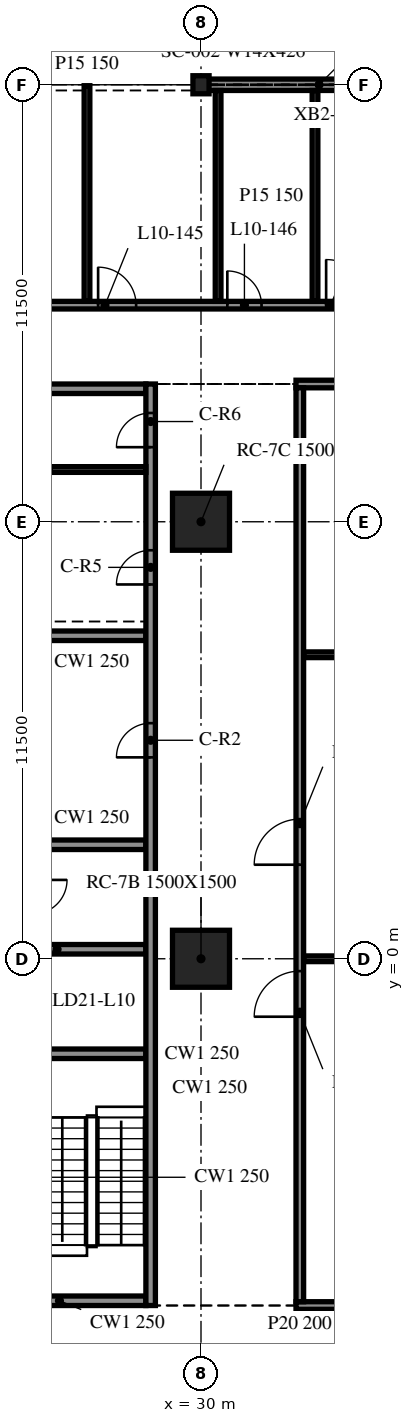
"""IFC4 building model, lengths in metres.
Left out: names, types, materials, properties, quantities, classifications, styles, units other than length and angle.
Written with IfcOpenShell. Run it as: python <this file> out.ifc"""

import sys

from ifc_helpers import new_model, si_unit, direction, frame, frame_2d, origin, origin_2d, place, context, subcontext, project, spatial, rectangle, i_section, extrude, element, fill, save


model = new_model("IFC4")
c1 = context("Model", 3, precision=1e-05, world=origin(), true_north=direction((0.0, 1.0)))
c2 = subcontext(c1, "Body", "Model", "MODEL_VIEW")
j1 = project(units=[si_unit("LENGTHUNIT", "METRE"), si_unit("PLANEANGLEUNIT", "RADIAN")], contexts=[c1])
p1 = place(None, origin())
s1 = spatial("IfcSite", under=j1, at=p1, CompositionType="ELEMENT")
p2 = place(p1, origin())
s2 = spatial("IfcBuilding", under=s1, at=p2, CompositionType="ELEMENT")
p3 = place(p2, frame((0.0, 0.0, 46.0)))
s3 = spatial("IfcBuildingStorey", under=s2, at=p3, CompositionType="ELEMENT", Elevation=46.0)
for number, where, z_axis, x_axis in (
    (1, (30.0, 0.0, -0.34), (0.0, 0.0, 1.0), (1.0, 0.0, 0.0)),
    (2, (30.0, 11.5, -0.34), (0.0, 0.0, 1.0), (1.0, 0.0, 0.0)),
):
    element("IfcColumn", number, at=place(p3, frame(where, z_axis=z_axis, x_axis=x_axis)), inside=s3, PredefinedType="COLUMN", context=c2, shape_type="SweptSolid", body=[
        extrude(rectangle(XDim=1.5, YDim=1.5, at=origin_2d()), origin(), (0.0, 0.0, 1.0), 4.3),
    ])
p4 = place(p3, frame((30.0, 23.0, -0.34), z_axis=(0.0, 0.0, 1.0), x_axis=(1.0, 0.0, 0.0)))
e3 = element("IfcColumn", 3, at=p4, inside=s3, PredefinedType="COLUMN", context=c2, shape_type="SweptSolid", body=[
    extrude(i_section(OverallWidth=0.424, OverallDepth=0.475, WebThickness=0.048, FlangeThickness=0.077, at=origin_2d()), origin(), (0.0, 0.0, 1.0), 4.3),
])
p5 = place(p3, frame((41.976, 23.0, 0.0), z_axis=(0.0, 0.0, 1.0), x_axis=(-1.0, 0.0, 0.0)))
e4 = element("IfcWall", 4, at=p5, inside=s3, PredefinedType="NOTDEFINED", context=c2, shape_type="SweptSolid", body=[
    extrude(rectangle(XDim=11.952, YDim=0.3, at=frame_2d((5.976, 0.0))), origin(), (0.0, 0.0, 1.0), 3.203),
])
p6 = place(p3, frame((28.675, -9.125, 0.0), z_axis=(0.0, 0.0, 1.0), x_axis=(0.0, 1.0, 0.0)))
e5 = element("IfcWall", 5, at=p6, inside=s3, PredefinedType="SOLIDWALL", context=c2, shape_type="SweptSolid", body=[
    extrude(rectangle(XDim=24.25, YDim=0.25, at=frame_2d((12.125, 0.0))), origin(), (0.0, 0.0, 1.0), 3.96),
])
p7 = place(p6, frame((14.425, 0.0, 0.0)))
e6 = element("IfcOpeningElement", 6, at=p7, cuts=e5, PredefinedType="OPENING", context=c2, shape_type="SweptSolid", body=[
    extrude(rectangle(XDim=0.9, YDim=2.1, at=frame_2d((0.45, 1.05))), frame((0.0, 0.135, 0.0), z_axis=(0.0, -1.0, 0.0), x_axis=(1.0, 0.0, 0.0)), (0.0, 0.0, 1.0), 0.27),
])
p8 = place(p6, frame((18.975, 0.0, 0.0)))
e7 = element("IfcOpeningElement", 7, at=p8, cuts=e5, PredefinedType="OPENING", context=c2, shape_type="SweptSolid", body=[
    extrude(rectangle(XDim=0.9, YDim=2.1, at=frame_2d((0.45, 1.05))), frame((0.0, 0.135, 0.0), z_axis=(0.0, -1.0, 0.0), x_axis=(1.0, 0.0, 0.0)), (0.0, 0.0, 1.0), 0.27),
])
p9 = place(p6, frame((22.587, 0.0, 0.0)))
e8 = element("IfcOpeningElement", 8, at=p9, cuts=e5, PredefinedType="OPENING", context=c2, shape_type="SweptSolid", body=[
    extrude(rectangle(XDim=0.9, YDim=2.1, at=frame_2d((0.45, 1.05))), frame((0.0, 0.135, 0.0), z_axis=(0.0, -1.0, 0.0), x_axis=(1.0, 0.0, 0.0)), (0.0, 0.0, 1.0), 0.27),
])
p10 = place(p3, frame((28.55, -9.0, 0.0), z_axis=(0.0, 0.0, 1.0), x_axis=(-1.0, 0.0, 0.0)))
e9 = element("IfcWall", 9, at=p10, inside=s3, PredefinedType="SOLIDWALL", context=c2, shape_type="SweptSolid", body=[
    extrude(rectangle(XDim=9.1, YDim=0.25, at=frame_2d((4.55, 0.0))), origin(), (0.0, 0.0, 1.0), 3.96),
])
p11 = place(p10, frame((3.65, 0.0, 0.0)))
e10 = element("IfcOpeningElement", 10, at=p11, cuts=e9, PredefinedType="OPENING", context=c2, shape_type="SweptSolid", body=[
    extrude(rectangle(XDim=1.8, YDim=2.1, at=frame_2d((0.9, 1.05))), frame((0.0, 0.135, 0.0), z_axis=(0.0, -1.0, 0.0), x_axis=(1.0, 0.0, 0.0)), (0.0, 0.0, 1.0), 0.27),
])
p12 = place(p3, frame((19.45, 15.0, 0.0), z_axis=(0.0, 0.0, 1.0), x_axis=(1.0, 0.0, 0.0)))
e11 = element("IfcWall", 11, at=p12, inside=s3, PredefinedType="SOLIDWALL", context=c2, shape_type="SweptSolid", body=[
    extrude(rectangle(XDim=9.1, YDim=0.25, at=frame_2d((4.55, 0.0))), origin(), (0.0, 0.0, 1.0), 3.96),
])
p13 = place(p12, frame((3.65, 0.0, 0.0)))
e12 = element("IfcOpeningElement", 12, at=p13, cuts=e11, PredefinedType="OPENING", context=c2, shape_type="SweptSolid", body=[
    extrude(rectangle(XDim=1.8, YDim=2.1, at=frame_2d((0.9, 1.05))), frame((0.0, 0.135, 0.0), z_axis=(0.0, -1.0, 0.0), x_axis=(1.0, 0.0, 0.0)), (0.0, 0.0, 1.0), 0.27),
])
for number, where, z_axis, x_axis in (
    (13, (25.7, -2.5, 0.0), (0.0, 0.0, 1.0), (1.0, 0.0, 0.0)),
    (14, (25.7, 0.25, 0.0), (0.0, 0.0, 1.0), (1.0, 0.0, 0.0)),
    (15, (25.7, 3.0, 0.0), (0.0, 0.0, 1.0), (1.0, 0.0, 0.0)),
    (16, (25.7, 8.5, 0.0), (0.0, 0.0, 1.0), (1.0, 0.0, 0.0)),
):
    element("IfcWall", number, at=place(p3, frame(where, z_axis=z_axis, x_axis=x_axis)), inside=s3, PredefinedType="SOLIDWALL", context=c2, shape_type="SweptSolid", body=[
        extrude(rectangle(XDim=2.85, YDim=0.25, at=frame_2d((1.425, 0.0))), origin(), (0.0, 0.0, 1.0), 3.96),
    ])
p14 = place(p3, frame((25.7, 12.875, 0.0), z_axis=(0.0, 0.0, 1.0), x_axis=(1.0, 0.0, 0.0)))
e17 = element("IfcWall", 17, at=p14, inside=s3, PredefinedType="PARTITIONING", context=c2, shape_type="SweptSolid", body=[
    extrude(rectangle(XDim=2.85, YDim=0.15, at=frame_2d((1.425, 0.0))), origin(), (0.0, 0.0, 1.0), 3.96),
])
p15 = place(p3, frame((32.5, -9.125, 0.0), z_axis=(0.0, 0.0, 1.0), x_axis=(1.0, 0.0, 0.0)))
e18 = element("IfcWall", 18, at=p15, inside=s3, PredefinedType="PARTITIONING", context=c2, shape_type="SweptSolid", body=[
    extrude(rectangle(XDim=19.45, YDim=0.2, at=frame_2d((9.725, 0.0))), origin(), (0.0, 0.0, 1.0), 3.96),
])
p16 = place(p15, frame((9.1, 0.0, 0.0)))
e19 = element("IfcOpeningElement", 19, at=p16, cuts=e18, PredefinedType="OPENING", context=c2, shape_type="SweptSolid", body=[
    extrude(rectangle(XDim=1.2, YDim=2.1, at=frame_2d((0.6, 1.05))), frame((0.0, 0.11, 0.0), z_axis=(0.0, -1.0, 0.0), x_axis=(1.0, 0.0, 0.0)), (0.0, 0.0, 1.0), 0.22),
])
p17 = place(p3, frame((32.7, 0.0, 0.0), z_axis=(0.0, 0.0, 1.0), x_axis=(1.0, 0.0, 0.0)))
e20 = element("IfcWall", 20, at=p17, inside=s3, PredefinedType="PARTITIONING", context=c2, shape_type="SweptSolid", body=[
    extrude(rectangle(XDim=8.55, YDim=0.15, at=frame_2d((4.275, 0.0))), origin(), (0.0, 0.0, 1.0), 3.96),
])
p18 = place(p3, frame((32.7, 8.0, 0.0), z_axis=(0.0, 0.0, 1.0), x_axis=(1.0, 0.0, 0.0)))
e21 = element("IfcWall", 21, at=p18, inside=s3, PredefinedType="PARTITIONING", context=c2, shape_type="SweptSolid", body=[
    extrude(rectangle(XDim=19.05, YDim=0.15, at=frame_2d((9.525, 0.0))), origin(), (0.0, 0.0, 1.0), 3.96),
])
p19 = place(p3, frame((32.5, 15.125, 0.0), z_axis=(0.0, 0.0, 1.0), x_axis=(1.0, 0.0, 0.0)))
e22 = element("IfcWall", 22, at=p19, inside=s3, PredefinedType="PARTITIONING", context=c2, shape_type="SweptSolid", body=[
    extrude(rectangle(XDim=19.45, YDim=0.2, at=frame_2d((9.725, 0.0))), origin(), (0.0, 0.0, 1.0), 3.96),
])
p20 = place(p19, frame((5.3, 0.0, 0.0)))
e23 = element("IfcOpeningElement", 23, at=p20, cuts=e22, PredefinedType="OPENING", context=c2, shape_type="SweptSolid", body=[
    extrude(rectangle(XDim=1.0, YDim=2.1, at=frame_2d((0.5, 1.05))), frame((0.0, 0.11, 0.0), z_axis=(0.0, -1.0, 0.0), x_axis=(1.0, 0.0, 0.0)), (0.0, 0.0, 1.0), 0.22),
])
p21 = place(p19, frame((9.3, 0.0, 0.0)))
e24 = element("IfcOpeningElement", 24, at=p21, cuts=e22, PredefinedType="OPENING", context=c2, shape_type="SweptSolid", body=[
    extrude(rectangle(XDim=1.0, YDim=2.1, at=frame_2d((0.5, 1.05))), frame((0.0, 0.11, 0.0), z_axis=(0.0, -1.0, 0.0), x_axis=(1.0, 0.0, 0.0)), (0.0, 0.0, 1.0), 0.22),
])
p22 = place(p3, frame((-41.807, 17.2, 0.0), z_axis=(0.0, 0.0, 1.0), x_axis=(1.0, 0.0, 0.0)))
e25 = element("IfcWall", 25, at=p22, inside=s3, PredefinedType="PARTITIONING", context=c2, shape_type="SweptSolid", body=[
    extrude(rectangle(XDim=95.615, YDim=0.2, at=frame_2d((47.807, 0.0))), origin(), (0.0, 0.0, 1.0), 3.96),
])
p23 = place(p22, frame((7.5, 0.0, 0.0)))
e26 = element("IfcOpeningElement", 26, at=p23, cuts=e25, PredefinedType="OPENING", context=c2, shape_type="SweptSolid", body=[
    extrude(rectangle(XDim=1.0, YDim=2.1, at=frame_2d((0.5, 1.05))), frame((0.0, 0.11, 0.0), z_axis=(0.0, -1.0, 0.0), x_axis=(1.0, 0.0, 0.0)), (0.0, 0.0, 1.0), 0.22),
])
p24 = place(p22, frame((10.9, 0.0, 0.0)))
e27 = element("IfcOpeningElement", 27, at=p24, cuts=e25, PredefinedType="OPENING", context=c2, shape_type="SweptSolid", body=[
    extrude(rectangle(XDim=1.0, YDim=2.1, at=frame_2d((0.5, 1.05))), frame((0.0, 0.11, 0.0), z_axis=(0.0, -1.0, 0.0), x_axis=(1.0, 0.0, 0.0)), (0.0, 0.0, 1.0), 0.22),
])
p25 = place(p22, frame((13.7, 0.0, 0.0)))
e28 = element("IfcOpeningElement", 28, at=p25, cuts=e25, PredefinedType="OPENING", context=c2, shape_type="SweptSolid", body=[
    extrude(rectangle(XDim=0.9, YDim=2.1, at=frame_2d((0.45, 1.05))), frame((0.0, 0.11, 0.0), z_axis=(0.0, -1.0, 0.0), x_axis=(1.0, 0.0, 0.0)), (0.0, 0.0, 1.0), 0.22),
])
p26 = place(p22, frame((22.3, 0.0, 0.0)))
e29 = element("IfcOpeningElement", 29, at=p26, cuts=e25, PredefinedType="OPENING", context=c2, shape_type="SweptSolid", body=[
    extrude(rectangle(XDim=1.2, YDim=2.1, at=frame_2d((0.6, 1.05))), frame((0.0, 0.11, 0.0), z_axis=(0.0, -1.0, 0.0), x_axis=(1.0, 0.0, 0.0)), (0.0, 0.0, 1.0), 0.22),
])
p27 = place(p22, frame((28.7, 0.0, 0.0)))
e30 = element("IfcOpeningElement", 30, at=p27, cuts=e25, PredefinedType="OPENING", context=c2, shape_type="SweptSolid", body=[
    extrude(rectangle(XDim=0.9, YDim=2.1, at=frame_2d((0.45, 1.05))), frame((0.0, 0.11, 0.0), z_axis=(0.0, -1.0, 0.0), x_axis=(1.0, 0.0, 0.0)), (0.0, 0.0, 1.0), 0.22),
])
p28 = place(p22, frame((37.5, 0.0, 0.0)))
e31 = element("IfcOpeningElement", 31, at=p28, cuts=e25, PredefinedType="OPENING", context=c2, shape_type="SweptSolid", body=[
    extrude(rectangle(XDim=1.0, YDim=2.1, at=frame_2d((0.5, 1.05))), frame((0.0, 0.11, 0.0), z_axis=(0.0, -1.0, 0.0), x_axis=(1.0, 0.0, 0.0)), (0.0, 0.0, 1.0), 0.22),
])
p29 = place(p22, frame((40.9, 0.0, 0.0)))
e32 = element("IfcOpeningElement", 32, at=p29, cuts=e25, PredefinedType="OPENING", context=c2, shape_type="SweptSolid", body=[
    extrude(rectangle(XDim=1.0, YDim=2.1, at=frame_2d((0.5, 1.05))), frame((0.0, 0.11, 0.0), z_axis=(0.0, -1.0, 0.0), x_axis=(1.0, 0.0, 0.0)), (0.0, 0.0, 1.0), 0.22),
])
p30 = place(p22, frame((43.7, 0.0, 0.0)))
e33 = element("IfcOpeningElement", 33, at=p30, cuts=e25, PredefinedType="OPENING", context=c2, shape_type="SweptSolid", body=[
    extrude(rectangle(XDim=0.9, YDim=2.1, at=frame_2d((0.45, 1.05))), frame((0.0, 0.11, 0.0), z_axis=(0.0, -1.0, 0.0), x_axis=(1.0, 0.0, 0.0)), (0.0, 0.0, 1.0), 0.22),
])
p31 = place(p22, frame((47.3, 0.0, 0.0)))
e34 = element("IfcOpeningElement", 34, at=p31, cuts=e25, PredefinedType="OPENING", context=c2, shape_type="SweptSolid", body=[
    extrude(rectangle(XDim=1.2, YDim=2.1, at=frame_2d((0.6, 1.05))), frame((0.0, 0.11, 0.0), z_axis=(0.0, -1.0, 0.0), x_axis=(1.0, 0.0, 0.0)), (0.0, 0.0, 1.0), 0.22),
])
p32 = place(p22, frame((54.1, 0.0, 0.0)))
e35 = element("IfcOpeningElement", 35, at=p32, cuts=e25, PredefinedType="OPENING", context=c2, shape_type="SweptSolid", body=[
    extrude(rectangle(XDim=0.9, YDim=2.1, at=frame_2d((0.45, 1.05))), frame((0.0, 0.11, 0.0), z_axis=(0.0, -1.0, 0.0), x_axis=(1.0, 0.0, 0.0)), (0.0, 0.0, 1.0), 0.22),
])
p33 = place(p22, frame((60.1, 0.0, 0.0)))
e36 = element("IfcOpeningElement", 36, at=p33, cuts=e25, PredefinedType="OPENING", context=c2, shape_type="SweptSolid", body=[
    extrude(rectangle(XDim=1.0, YDim=2.1, at=frame_2d((0.5, 1.05))), frame((0.0, 0.11, 0.0), z_axis=(0.0, -1.0, 0.0), x_axis=(1.0, 0.0, 0.0)), (0.0, 0.0, 1.0), 0.22),
])
p34 = place(p22, frame((69.1, 0.0, 0.0)))
e37 = element("IfcOpeningElement", 37, at=p34, cuts=e25, PredefinedType="OPENING", context=c2, shape_type="SweptSolid", body=[
    extrude(rectangle(XDim=1.0, YDim=2.1, at=frame_2d((0.5, 1.05))), frame((0.0, 0.11, 0.0), z_axis=(0.0, -1.0, 0.0), x_axis=(1.0, 0.0, 0.0)), (0.0, 0.0, 1.0), 0.22),
])
p35 = place(p22, frame((72.5, 0.0, 0.0)))
e38 = element("IfcOpeningElement", 38, at=p35, cuts=e25, PredefinedType="OPENING", context=c2, shape_type="SweptSolid", body=[
    extrude(rectangle(XDim=0.9, YDim=2.1, at=frame_2d((0.45, 1.05))), frame((0.0, 0.11, 0.0), z_axis=(0.0, -1.0, 0.0), x_axis=(1.0, 0.0, 0.0)), (0.0, 0.0, 1.0), 0.22),
])
p36 = place(p22, frame((75.1, 0.0, 0.0)))
e39 = element("IfcOpeningElement", 39, at=p36, cuts=e25, PredefinedType="OPENING", context=c2, shape_type="SweptSolid", body=[
    extrude(rectangle(XDim=1.2, YDim=2.1, at=frame_2d((0.6, 1.05))), frame((0.0, 0.11, 0.0), z_axis=(0.0, -1.0, 0.0), x_axis=(1.0, 0.0, 0.0)), (0.0, 0.0, 1.0), 0.22),
])
p37 = place(p22, frame((84.1, 0.0, 0.0)))
e40 = element("IfcOpeningElement", 40, at=p37, cuts=e25, PredefinedType="OPENING", context=c2, shape_type="SweptSolid", body=[
    extrude(rectangle(XDim=0.9, YDim=2.1, at=frame_2d((0.45, 1.05))), frame((0.0, 0.11, 0.0), z_axis=(0.0, -1.0, 0.0), x_axis=(1.0, 0.0, 0.0)), (0.0, 0.0, 1.0), 0.22),
])
p38 = place(p22, frame((90.1, 0.0, 0.0)))
e41 = element("IfcOpeningElement", 41, at=p38, cuts=e25, PredefinedType="OPENING", context=c2, shape_type="SweptSolid", body=[
    extrude(rectangle(XDim=1.0, YDim=2.1, at=frame_2d((0.5, 1.05))), frame((0.0, 0.11, 0.0), z_axis=(0.0, -1.0, 0.0), x_axis=(1.0, 0.0, 0.0)), (0.0, 0.0, 1.0), 0.22),
])
p39 = place(p3, frame((27.0, 17.3, 0.0), z_axis=(0.0, 0.0, 1.0), x_axis=(0.0, 1.0, 0.0)))
e42 = element("IfcWall", 42, at=p39, inside=s3, PredefinedType="PARTITIONING", context=c2, shape_type="SweptSolid", body=[
    extrude(rectangle(XDim=5.675, YDim=0.15, at=frame_2d((2.837, 0.0))), origin(), (0.0, 0.0, 1.0), 3.96),
])
p40 = place(p3, frame((30.45, 17.3, 0.0), z_axis=(0.0, 0.0, 1.0), x_axis=(0.0, 1.0, 0.0)))
e43 = element("IfcWall", 43, at=p40, inside=s3, PredefinedType="PARTITIONING", context=c2, shape_type="SweptSolid", body=[
    extrude(rectangle(XDim=5.55, YDim=0.15, at=frame_2d((2.775, 0.0))), origin(), (0.0, 0.0, 1.0), 3.96),
])
p41 = place(p3, frame((32.6, -9.025, 0.0), z_axis=(0.0, 0.0, 1.0), x_axis=(0.0, 1.0, 0.0)))
e44 = element("IfcWall", 44, at=p41, inside=s3, PredefinedType="PARTITIONING", context=c2, shape_type="SweptSolid", body=[
    extrude(rectangle(XDim=24.05, YDim=0.2, at=frame_2d((12.025, 0.0))), origin(), (0.0, 0.0, 1.0), 3.96),
])
p42 = place(p41, frame((7.5, 0.0, 0.0)))
e45 = element("IfcOpeningElement", 45, at=p42, cuts=e44, PredefinedType="OPENING", context=c2, shape_type="SweptSolid", body=[
    extrude(rectangle(XDim=1.2, YDim=2.1, at=frame_2d((0.6, 1.05))), frame((0.0, 0.11, 0.0), z_axis=(0.0, -1.0, 0.0), x_axis=(1.0, 0.0, 0.0)), (0.0, 0.0, 1.0), 0.22),
])
p43 = place(p41, frame((11.5, 0.0, 0.0)))
e46 = element("IfcOpeningElement", 46, at=p43, cuts=e44, PredefinedType="OPENING", context=c2, shape_type="SweptSolid", body=[
    extrude(rectangle(XDim=1.2, YDim=2.1, at=frame_2d((0.6, 1.05))), frame((0.0, 0.11, 0.0), z_axis=(0.0, -1.0, 0.0), x_axis=(1.0, 0.0, 0.0)), (0.0, 0.0, 1.0), 0.22),
])
p44 = place(p3, frame((33.0, 17.3, 0.0), z_axis=(0.0, 0.0, 1.0), x_axis=(0.0, 1.0, 0.0)))
e47 = element("IfcWall", 47, at=p44, inside=s3, PredefinedType="PARTITIONING", context=c2, shape_type="SweptSolid", body=[
    extrude(rectangle(XDim=5.55, YDim=0.15, at=frame_2d((2.775, 0.0))), origin(), (0.0, 0.0, 1.0), 3.96),
])
p45 = place(p7, origin())
e48 = element("IfcDoor", 48, at=p45, inside=s3, OperationType="SINGLE_SWING_RIGHT", PredefinedType="DOOR", context=c2, shape_type="SweptSolid", body=[
    extrude(rectangle(XDim=0.9, YDim=2.1, at=frame_2d((0.45, 1.05))), frame((0.0, 0.025, 0.0), z_axis=(0.0, -1.0, 0.0), x_axis=(1.0, 0.0, 0.0)), (0.0, 0.0, 1.0), 0.05),
])
fill(e6, e48)
p46 = place(p8, origin())
e49 = element("IfcDoor", 49, at=p46, inside=s3, OperationType="SINGLE_SWING_LEFT", PredefinedType="DOOR", context=c2, shape_type="SweptSolid", body=[
    extrude(rectangle(XDim=0.9, YDim=2.1, at=frame_2d((0.45, 1.05))), frame((0.0, 0.025, 0.0), z_axis=(0.0, -1.0, 0.0), x_axis=(1.0, 0.0, 0.0)), (0.0, 0.0, 1.0), 0.05),
])
fill(e7, e49)
p47 = place(p9, origin())
e50 = element("IfcDoor", 50, at=p47, inside=s3, OperationType="SINGLE_SWING_RIGHT", PredefinedType="DOOR", context=c2, shape_type="SweptSolid", body=[
    extrude(rectangle(XDim=0.9, YDim=2.1, at=frame_2d((0.45, 1.05))), frame((0.0, 0.025, 0.0), z_axis=(0.0, -1.0, 0.0), x_axis=(1.0, 0.0, 0.0)), (0.0, 0.0, 1.0), 0.05),
])
fill(e8, e50)
p48 = place(p42, origin())
e51 = element("IfcDoor", 51, at=p48, inside=s3, OperationType="SINGLE_SWING_RIGHT", PredefinedType="DOOR", context=c2, shape_type="SweptSolid", body=[
    extrude(rectangle(XDim=1.2, YDim=2.1, at=frame_2d((0.6, 1.05))), frame((0.0, 0.025, 0.0), z_axis=(0.0, -1.0, 0.0), x_axis=(1.0, 0.0, 0.0)), (0.0, 0.0, 1.0), 0.05),
])
fill(e45, e51)
p49 = place(p43, origin())
e52 = element("IfcDoor", 52, at=p49, inside=s3, OperationType="SINGLE_SWING_LEFT", PredefinedType="DOOR", context=c2, shape_type="SweptSolid", body=[
    extrude(rectangle(XDim=1.2, YDim=2.1, at=frame_2d((0.6, 1.05))), frame((0.0, 0.025, 0.0), z_axis=(0.0, -1.0, 0.0), x_axis=(1.0, 0.0, 0.0)), (0.0, 0.0, 1.0), 0.05),
])
fill(e46, e52)
p50 = place(p34, origin())
e53 = element("IfcDoor", 53, at=p50, inside=s3, OperationType="SINGLE_SWING_RIGHT", PredefinedType="DOOR", context=c2, shape_type="SweptSolid", body=[
    extrude(rectangle(XDim=1.0, YDim=2.1, at=frame_2d((0.5, 1.05))), frame((0.0, 0.025, 0.0), z_axis=(0.0, -1.0, 0.0), x_axis=(1.0, 0.0, 0.0)), (0.0, 0.0, 1.0), 0.05),
])
fill(e37, e53)
p51 = place(p35, origin())
e54 = element("IfcDoor", 54, at=p51, inside=s3, OperationType="SINGLE_SWING_RIGHT", PredefinedType="DOOR", context=c2, shape_type="SweptSolid", body=[
    extrude(rectangle(XDim=0.9, YDim=2.1, at=frame_2d((0.45, 1.05))), frame((0.0, 0.025, 0.0), z_axis=(0.0, -1.0, 0.0), x_axis=(1.0, 0.0, 0.0)), (0.0, 0.0, 1.0), 0.05),
])
fill(e38, e54)
p52 = place(p36, origin())
e55 = element("IfcDoor", 55, at=p52, inside=s3, OperationType="SINGLE_SWING_RIGHT", PredefinedType="DOOR", context=c2, shape_type="SweptSolid", body=[
    extrude(rectangle(XDim=1.2, YDim=2.1, at=frame_2d((0.6, 1.05))), frame((0.0, 0.025, 0.0), z_axis=(0.0, -1.0, 0.0), x_axis=(1.0, 0.0, 0.0)), (0.0, 0.0, 1.0), 0.05),
])
fill(e39, e55)
save(model, sys.argv[1])
